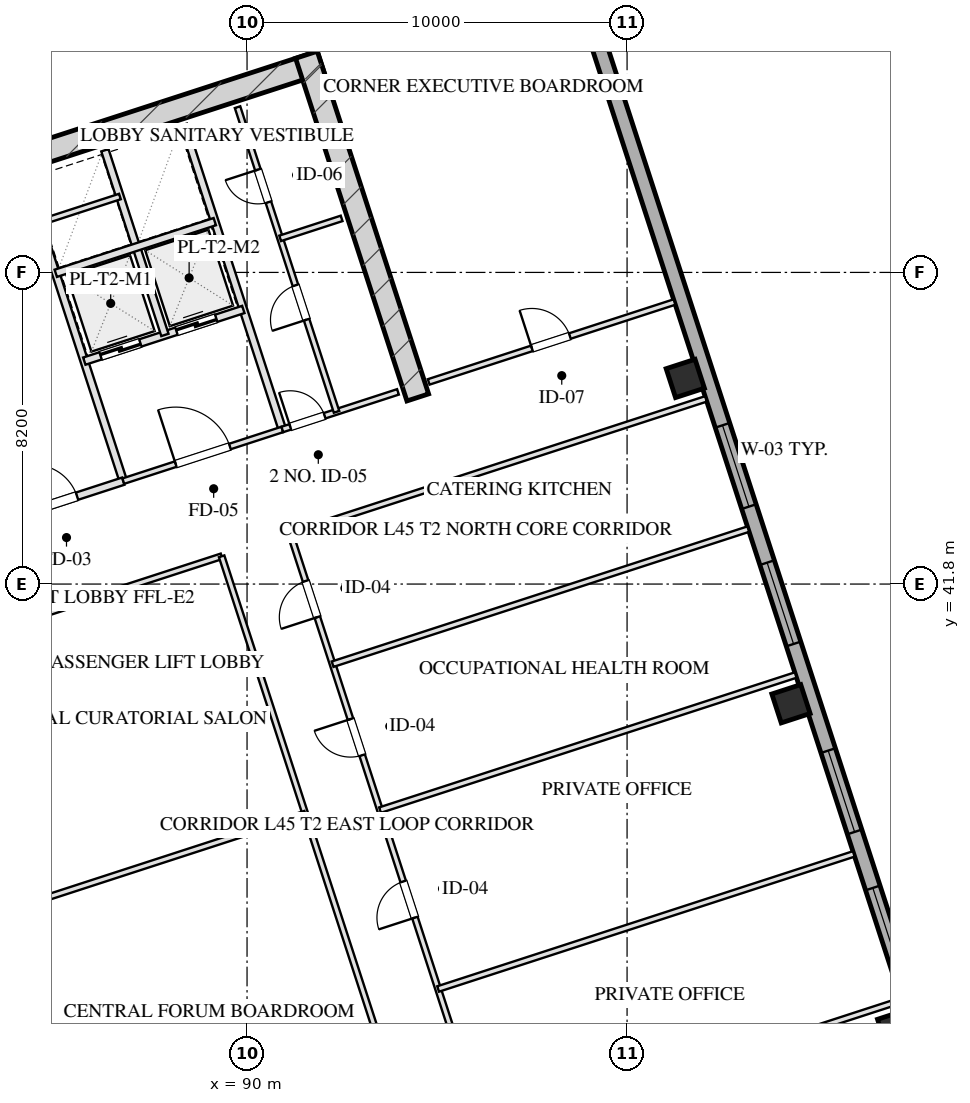
"""IFC4 building model, lengths in metres.
Left out: names, types, materials, properties, quantities, classifications, styles, units other than length and angle.
Written with IfcOpenShell. Run it as: python <this file> out.ifc"""

import sys

from ifc_helpers import new_model, si_unit, direction, frame, frame_2d, origin, origin_2d, place, context, subcontext, project, spatial, rectangle, hollow_rectangle, extrude, element, fill, save


model = new_model("IFC4")
c1 = context("Model", 3, precision=1e-05, world=origin(), true_north=direction((0.0, 1.0)))
c2 = subcontext(c1, "Body", "Model", "MODEL_VIEW")
j1 = project(units=[si_unit("LENGTHUNIT", "METRE"), si_unit("PLANEANGLEUNIT", "RADIAN")], contexts=[c1])
p1 = place(None, origin())
s1 = spatial("IfcSite", under=j1, at=p1, CompositionType="ELEMENT")
p2 = place(p1, origin())
s2 = spatial("IfcBuilding", under=s1, at=p2, CompositionType="ELEMENT")
p3 = place(p2, frame((0.0, 0.0, 170.2)))
s3 = spatial("IfcBuildingStorey", under=s2, at=p3, CompositionType="ELEMENT", Elevation=170.2)
p4 = place(p3, frame((76.344, 50.466, 0.0), z_axis=(0.0, 0.0, 1.0), x_axis=(0.951055727519, 0.309019421968, 0.0)))
e1 = element("IfcWall", 1, at=p4, inside=s3, PredefinedType="SHEAR", context=c2, shape_type="SweptSolid", body=[
    extrude(rectangle(XDim=16.4, YDim=0.6, at=frame_2d((8.2, 0.0))), origin(), (0.0, 0.0, 1.0), 3.45),
])
p5 = place(p3, frame((94.492, 46.71, 0.0), z_axis=(0.0, 0.0, 1.0), x_axis=(-0.309010370028, 0.95105866865, 0.0)))
e2 = element("IfcWall", 2, at=p5, inside=s3, PredefinedType="SHEAR", context=c2, shape_type="SweptSolid", body=[
    extrude(rectangle(XDim=9.48, YDim=0.6, at=frame_2d((4.74, 0.0))), origin(), (0.0, 0.0, 1.0), 3.45),
])
for number, where, z_axis, x_axis in (
    (3, (107.094, 30.091, 0.0), (0.0, 0.0, 1.0), (0.951, 0.309, 0.0)),
    (4, (104.313, 38.651, 0.0), (0.0, 0.0, 1.0), (0.951, 0.309, 0.0)),
    (5, (101.532, 47.21, 0.0), (0.0, 0.0, 1.0), (0.951, 0.309, 0.0)),
):
    element("IfcColumn", number, at=place(p3, frame(where, z_axis=z_axis, x_axis=x_axis)), inside=s3, PredefinedType="COLUMN", context=c2, shape_type="SweptSolid", body=[
        extrude(hollow_rectangle(XDim=0.8, YDim=0.8, WallThickness=0.028, at=origin_2d()), origin(), (0.0, 0.0, 1.0), 3.451),
    ])
p6 = place(p3, frame((70.092, 52.556, 0.0), z_axis=(0.0, 0.0, 1.0), x_axis=(0.951057580055, 0.30901372044, 0.0)))
e6 = element("IfcWall", 6, at=p6, inside=s3, PredefinedType="SOLIDWALL", context=c2, shape_type="SweptSolid", body=[
    extrude(rectangle(XDim=26.4, YDim=0.4, at=frame_2d((13.2, 0.0))), origin(), (0.0, 0.0, 1.0), 2.61),
])
p7 = place(p3, frame((98.224, 59.173, 0.0), z_axis=(0.0, 0.0, 1.0), x_axis=(0.309014228706, -0.951057414911, 0.0)))
e7 = element("IfcWall", 7, at=p7, inside=s3, PredefinedType="SOLIDWALL", context=c2, shape_type="SweptSolid", body=[
    extrude(rectangle(XDim=42.8, YDim=0.4, at=frame_2d((21.4, 0.0))), origin(), (0.0, 0.0, 1.0), 2.61),
])
p8 = place(p7, frame((26.675, 0.0, 0.75)))
e8 = element("IfcOpeningElement", 8, at=p8, cuts=e7, PredefinedType="OPENING", context=c2, shape_type="SweptSolid", body=[
    extrude(rectangle(XDim=2.25, YDim=1.46, at=frame_2d((1.125, 0.73))), frame((0.0, 0.21, 0.0), z_axis=(0.0, -1.0, 0.0), x_axis=(1.0, 0.0, 0.0)), (0.0, 0.0, 1.0), 0.42),
])
p9 = place(p7, frame((22.875, 0.0, 0.75)))
e9 = element("IfcOpeningElement", 9, at=p9, cuts=e7, PredefinedType="OPENING", context=c2, shape_type="SweptSolid", body=[
    extrude(rectangle(XDim=2.25, YDim=1.46, at=frame_2d((1.125, 0.73))), frame((0.0, 0.21, 0.0), z_axis=(0.0, -1.0, 0.0), x_axis=(1.0, 0.0, 0.0)), (0.0, 0.0, 1.0), 0.42),
])
p10 = place(p7, frame((17.675, 0.0, 0.75)))
e10 = element("IfcOpeningElement", 10, at=p10, cuts=e7, PredefinedType="OPENING", context=c2, shape_type="SweptSolid", body=[
    extrude(rectangle(XDim=2.25, YDim=1.46, at=frame_2d((1.125, 0.73))), frame((0.0, 0.21, 0.0), z_axis=(0.0, -1.0, 0.0), x_axis=(1.0, 0.0, 0.0)), (0.0, 0.0, 1.0), 0.42),
])
p11 = place(p7, frame((13.875, 0.0, 0.75)))
e11 = element("IfcOpeningElement", 11, at=p11, cuts=e7, PredefinedType="OPENING", context=c2, shape_type="SweptSolid", body=[
    extrude(rectangle(XDim=2.25, YDim=1.46, at=frame_2d((1.125, 0.73))), frame((0.0, 0.21, 0.0), z_axis=(0.0, -1.0, 0.0), x_axis=(1.0, 0.0, 0.0)), (0.0, 0.0, 1.0), 0.42),
])
p12 = place(p3, frame((86.743, 44.508, 0.0), z_axis=(0.0, 0.0, 1.0), x_axis=(-0.309016001439, 0.951056838919, 0.0)))
e12 = element("IfcWall", 12, at=p12, inside=s3, PredefinedType="PARTITIONING", context=c2, shape_type="SweptSolid", body=[
    extrude(rectangle(XDim=8.43, YDim=0.2, at=frame_2d((4.215, 0.0))), origin(), (0.0, 0.0, 1.0), 3.175),
])
p13 = place(p3, frame((83.101, 43.324, 0.0), z_axis=(0.0, 0.0, 1.0), x_axis=(0.951052804469, 0.309028417967, 0.0)))
e13 = element("IfcWall", 13, at=p13, inside=s3, PredefinedType="PARTITIONING", context=c2, shape_type="SweptSolid", body=[
    extrude(rectangle(XDim=3.83, YDim=0.2, at=frame_2d((1.915, 0.0))), origin(), (0.0, 0.0, 1.0), 3.175),
])
p14 = place(p13, frame((1.35, 0.0, 0.0)))
e14 = element("IfcOpeningElement", 14, at=p14, cuts=e13, PredefinedType="OPENING", context=c2, shape_type="SweptSolid", body=[
    extrude(rectangle(XDim=1.2, YDim=2.05, at=frame_2d((0.6, 1.025))), frame((0.0, 0.11, 0.0), z_axis=(0.0, -1.0, 0.0), x_axis=(1.0, 0.0, 0.0)), (0.0, 0.0, 1.0), 0.22),
])
p15 = place(p3, frame((90.928, 45.868, 0.0), z_axis=(0.0, 0.0, 1.0), x_axis=(-0.309042196757, 0.951048327176, 0.0)))
e15 = element("IfcWall", 15, at=p15, inside=s3, PredefinedType="PARTITIONING", context=c2, shape_type="SweptSolid", body=[
    extrude(rectangle(XDim=8.43, YDim=0.2, at=frame_2d((4.215, 0.0))), origin(), (0.0, 0.0, 1.0), 3.175),
])
p16 = place(p3, frame((86.743, 44.508, 0.0), z_axis=(0.0, 0.0, 1.0), x_axis=(0.951063829732, 0.308994485023, 0.0)))
e16 = element("IfcWall", 16, at=p16, inside=s3, PredefinedType="PARTITIONING", context=c2, shape_type="SweptSolid", body=[
    extrude(rectangle(XDim=4.4, YDim=0.15, at=frame_2d((2.2, 0.0))), origin(), (0.0, 0.0, 1.0), 3.175),
])
p17 = place(p16, frame((1.45, 0.0, 0.0)))
e17 = element("IfcOpeningElement", 17, at=p17, cuts=e16, PredefinedType="OPENING", context=c2, shape_type="SweptSolid", body=[
    extrude(rectangle(XDim=1.5, YDim=2.05, at=frame_2d((0.75, 1.025))), frame((0.0, 0.085, 0.0), z_axis=(0.0, -1.0, 0.0), x_axis=(1.0, 0.0, 0.0)), (0.0, 0.0, 1.0), 0.17),
])
p18 = place(p3, frame((85.718, 47.666, 0.0), z_axis=(0.0, 0.0, 1.0), x_axis=(0.951058531764, 0.30901079133, 0.0)))
e18 = element("IfcWall", 18, at=p18, inside=s3, PredefinedType="PARTITIONING", context=c2, shape_type="SweptSolid", body=[
    extrude(rectangle(XDim=4.4, YDim=0.2, at=frame_2d((2.2, 0.0))), origin(), (0.0, 0.0, 1.0), 3.175),
])
p19 = place(p18, frame((0.45, 0.0, 0.0)))
e19 = element("IfcOpeningElement", 19, at=p19, cuts=e18, PredefinedType="OPENING", context=c2, shape_type="SweptSolid", body=[
    extrude(rectangle(XDim=1.1, YDim=2.05, at=frame_2d((0.55, 1.025))), frame((0.0, 0.11, 0.0), z_axis=(0.0, -1.0, 0.0), x_axis=(1.0, 0.0, 0.0)), (0.0, 0.0, 1.0), 0.22),
])
p20 = place(p18, frame((2.55, 0.0, 0.0)))
e20 = element("IfcOpeningElement", 20, at=p20, cuts=e18, PredefinedType="OPENING", context=c2, shape_type="SweptSolid", body=[
    extrude(rectangle(XDim=1.1, YDim=2.05, at=frame_2d((0.55, 1.025))), frame((0.0, 0.11, 0.0), z_axis=(0.0, -1.0, 0.0), x_axis=(1.0, 0.0, 0.0)), (0.0, 0.0, 1.0), 0.22),
])
p21 = place(p3, frame((87.838, 48.354, 0.0), z_axis=(0.0, 0.0, 1.0), x_axis=(-0.3090093719, 0.951058992953, 0.0)))
e21 = element("IfcWall", 21, at=p21, inside=s3, PredefinedType="PARTITIONING", context=c2, shape_type="SweptSolid", body=[
    extrude(rectangle(XDim=5.11, YDim=0.2, at=frame_2d((2.555, 0.0))), origin(), (0.0, 0.0, 1.0), 3.175),
])
p22 = place(p3, frame((84.967, 49.977, 0.0), z_axis=(0.0, 0.0, 1.0), x_axis=(0.951063829732, 0.308994485023, 0.0)))
e22 = element("IfcWall", 22, at=p22, inside=s3, PredefinedType="PARTITIONING", context=c2, shape_type="SweptSolid", body=[
    extrude(rectangle(XDim=4.4, YDim=0.2, at=frame_2d((2.2, 0.0))), origin(), (0.0, 0.0, 1.0), 3.175),
])
p23 = place(p3, frame((84.534, 51.308, 0.0), z_axis=(0.0, 0.0, 1.0), x_axis=(0.951075093106, 0.308959814982, 0.0)))
e23 = element("IfcWall", 23, at=p23, inside=s3, PredefinedType="PARTITIONING", context=c2, shape_type="SweptSolid", body=[
    extrude(rectangle(XDim=2.23, YDim=0.15, at=frame_2d((1.115, 0.0))), origin(), (0.0, 0.0, 1.0), 3.175),
])
p24 = place(p3, frame((90.928, 45.868, 0.0), z_axis=(0.0, 0.0, 1.0), x_axis=(0.951059297078, 0.309008435874, 0.0)))
e24 = element("IfcWall", 24, at=p24, inside=s3, PredefinedType="PARTITIONING", context=c2, shape_type="SweptSolid", body=[
    extrude(rectangle(XDim=3.2, YDim=0.15, at=frame_2d((1.6, 0.0))), origin(), (0.0, 0.0, 1.0), 3.175),
])
p25 = place(p24, frame((0.22, 0.0, 0.0)))
e25 = element("IfcOpeningElement", 25, at=p25, cuts=e24, PredefinedType="OPENING", context=c2, shape_type="SweptSolid", body=[
    extrude(rectangle(XDim=0.95, YDim=2.05, at=frame_2d((0.475, 1.025))), frame((0.0, 0.085, 0.0), z_axis=(0.0, -1.0, 0.0), x_axis=(1.0, 0.0, 0.0)), (0.0, 0.0, 1.0), 0.17),
])
p26 = place(p3, frame((92.355, 46.331, 0.0), z_axis=(0.0, 0.0, 1.0), x_axis=(-0.309007490203, 0.951059604335, 0.0)))
e26 = element("IfcWall", 26, at=p26, inside=s3, PredefinedType="PARTITIONING", context=c2, shape_type="SweptSolid", body=[
    extrude(rectangle(XDim=8.43, YDim=0.15, at=frame_2d((4.215, 0.0))), origin(), (0.0, 0.0, 1.0), 3.175),
])
p27 = place(p26, frame((2.55, 0.0, 0.0)))
e27 = element("IfcOpeningElement", 27, at=p27, cuts=e26, PredefinedType="OPENING", context=c2, shape_type="SweptSolid", body=[
    extrude(rectangle(XDim=0.95, YDim=2.05, at=frame_2d((0.475, 1.025))), frame((0.0, 0.085, 0.0), z_axis=(0.0, -1.0, 0.0), x_axis=(1.0, 0.0, 0.0)), (0.0, 0.0, 1.0), 0.17),
])
p28 = place(p26, frame((5.8, 0.0, 0.0)))
e28 = element("IfcOpeningElement", 28, at=p28, cuts=e26, PredefinedType="OPENING", context=c2, shape_type="SweptSolid", body=[
    extrude(rectangle(XDim=0.9, YDim=2.05, at=frame_2d((0.45, 1.025))), frame((0.0, 0.085, 0.0), z_axis=(0.0, -1.0, 0.0), x_axis=(1.0, 0.0, 0.0)), (0.0, 0.0, 1.0), 0.17),
])
p29 = place(p3, frame((90.871, 50.896, 0.0), z_axis=(0.0, 0.0, 1.0), x_axis=(0.951054116971, 0.309024378638, 0.0)))
e29 = element("IfcWall", 29, at=p29, inside=s3, PredefinedType="PARTITIONING", context=c2, shape_type="SweptSolid", body=[
    extrude(rectangle(XDim=1.7, YDim=0.15, at=frame_2d((0.85, 0.0))), origin(), (0.0, 0.0, 1.0), 3.175),
])
p30 = place(p3, frame((94.78, 47.119, 0.0), z_axis=(0.0, 0.0, 1.0), x_axis=(0.951057811516, 0.309013008068, 0.0)))
e30 = element("IfcWall", 30, at=p30, inside=s3, PredefinedType="PARTITIONING", context=c2, shape_type="SweptSolid", body=[
    extrude(rectangle(XDim=6.8, YDim=0.15, at=frame_2d((3.4, 0.0))), origin(), (0.0, 0.0, 1.0), 3.175),
])
p31 = place(p30, frame((2.856, 0.0, 0.0)))
e31 = element("IfcOpeningElement", 31, at=p31, cuts=e30, PredefinedType="OPENING", context=c2, shape_type="SweptSolid", body=[
    extrude(rectangle(XDim=1.05, YDim=2.05, at=frame_2d((0.525, 1.025))), frame((0.0, 0.085, 0.0), z_axis=(0.0, -1.0, 0.0), x_axis=(1.0, 0.0, 0.0)), (0.0, 0.0, 1.0), 0.17),
])
p32 = place(p3, frame((96.28, 27.292, 0.0), z_axis=(0.0, 0.0, 1.0), x_axis=(0.951056999652, 0.309015506751, 0.0)))
e32 = element("IfcWall", 32, at=p32, inside=s3, PredefinedType="PARTITIONING", context=c2, shape_type="SweptSolid", body=[
    extrude(rectangle(XDim=11.5, YDim=0.15, at=frame_2d((5.75, 0.0))), origin(), (0.0, 0.0, 1.0), 3.175),
])
p33 = place(p3, frame((81.152, 39.873, 0.0), z_axis=(0.0, 0.0, 1.0), x_axis=(0.951057640494, 0.309013534425, 0.0)))
e33 = element("IfcWall", 33, at=p33, inside=s3, PredefinedType="PARTITIONING", context=c2, shape_type="SweptSolid", body=[
    extrude(rectangle(XDim=8.6, YDim=0.15, at=frame_2d((4.3, 0.0))), origin(), (0.0, 0.0, 1.0), 3.175),
])
p34 = place(p3, frame((91.138, 43.118, 0.0), z_axis=(0.0, 0.0, 1.0), x_axis=(0.951054972381, 0.309021746015, 0.0)))
e34 = element("IfcWall", 34, at=p34, inside=s3, PredefinedType="PARTITIONING", context=c2, shape_type="SweptSolid", body=[
    extrude(rectangle(XDim=11.5, YDim=0.15, at=frame_2d((5.75, 0.0))), origin(), (0.0, 0.0, 1.0), 3.175),
])
p35 = place(p3, frame((86.294, 24.048, 0.0), z_axis=(0.0, 0.0, 1.0), x_axis=(-0.309004459387, 0.951060589068, 0.0)))
e35 = element("IfcWall", 35, at=p35, inside=s3, PredefinedType="PARTITIONING", context=c2, shape_type="SweptSolid", body=[
    extrude(rectangle(XDim=16.64, YDim=0.15, at=frame_2d((8.32, 0.0))), origin(), (0.0, 0.0, 1.0), 3.175),
])
p36 = place(p35, frame((4.284, 0.0, 0.0)))
e36 = element("IfcOpeningElement", 36, at=p36, cuts=e35, PredefinedType="OPENING", context=c2, shape_type="SweptSolid", body=[
    extrude(rectangle(XDim=1.1, YDim=2.05, at=frame_2d((0.55, 1.025))), frame((0.0, 0.085, 0.0), z_axis=(0.0, -1.0, 0.0), x_axis=(1.0, 0.0, 0.0)), (0.0, 0.0, 1.0), 0.17),
])
p37 = place(p35, frame((12.724, 0.0, 0.0)))
e37 = element("IfcOpeningElement", 37, at=p37, cuts=e35, PredefinedType="OPENING", context=c2, shape_type="SweptSolid", body=[
    extrude(rectangle(XDim=1.1, YDim=2.05, at=frame_2d((0.55, 1.025))), frame((0.0, 0.085, 0.0), z_axis=(0.0, -1.0, 0.0), x_axis=(1.0, 0.0, 0.0)), (0.0, 0.0, 1.0), 0.17),
])
p38 = place(p3, frame((94.473, 26.705, 0.0), z_axis=(0.0, 0.0, 1.0), x_axis=(-0.309022042254, 0.951054876125, 0.0)))
e38 = element("IfcWall", 38, at=p38, inside=s3, PredefinedType="PARTITIONING", context=c2, shape_type="SweptSolid", body=[
    extrude(rectangle(XDim=16.64, YDim=0.15, at=frame_2d((8.32, 0.0))), origin(), (0.0, 0.0, 1.0), 3.175),
])
p39 = place(p3, frame((96.28, 27.292, 0.0), z_axis=(0.0, 0.0, 1.0), x_axis=(-0.309008771245, 0.951059188113, 0.0)))
e39 = element("IfcWall", 39, at=p39, inside=s3, PredefinedType="PARTITIONING", context=c2, shape_type="SweptSolid", body=[
    extrude(rectangle(XDim=16.64, YDim=0.15, at=frame_2d((8.32, 0.0))), origin(), (0.0, 0.0, 1.0), 3.175),
])
p40 = place(p39, frame((1.526, 0.0, 0.0)))
e40 = element("IfcOpeningElement", 40, at=p40, cuts=e39, PredefinedType="OPENING", context=c2, shape_type="SweptSolid", body=[
    extrude(rectangle(XDim=1.0, YDim=2.05, at=frame_2d((0.5, 1.025))), frame((0.0, 0.085, 0.0), z_axis=(0.0, -1.0, 0.0), x_axis=(1.0, 0.0, 0.0)), (0.0, 0.0, 1.0), 0.17),
])
p41 = place(p39, frame((6.026, 0.0, 0.0)))
e41 = element("IfcOpeningElement", 41, at=p41, cuts=e39, PredefinedType="OPENING", context=c2, shape_type="SweptSolid", body=[
    extrude(rectangle(XDim=1.0, YDim=2.05, at=frame_2d((0.5, 1.025))), frame((0.0, 0.085, 0.0), z_axis=(0.0, -1.0, 0.0), x_axis=(1.0, 0.0, 0.0)), (0.0, 0.0, 1.0), 0.17),
])
p42 = place(p39, frame((10.519, 0.0, 0.0)))
e42 = element("IfcOpeningElement", 42, at=p42, cuts=e39, PredefinedType="OPENING", context=c2, shape_type="SweptSolid", body=[
    extrude(rectangle(XDim=1.0, YDim=2.05, at=frame_2d((0.5, 1.025))), frame((0.0, 0.085, 0.0), z_axis=(0.0, -1.0, 0.0), x_axis=(1.0, 0.0, 0.0)), (0.0, 0.0, 1.0), 0.17),
])
p43 = place(p39, frame((14.338, 0.0, 0.0)))
e43 = element("IfcOpeningElement", 43, at=p43, cuts=e39, PredefinedType="OPENING", context=c2, shape_type="SweptSolid", body=[
    extrude(rectangle(XDim=1.0, YDim=2.05, at=frame_2d((0.5, 1.025))), frame((0.0, 0.085, 0.0), z_axis=(0.0, -1.0, 0.0), x_axis=(1.0, 0.0, 0.0)), (0.0, 0.0, 1.0), 0.17),
])
p44 = place(p3, frame((83.352, 33.102, 0.0), z_axis=(0.0, 0.0, 1.0), x_axis=(0.951057640494, 0.309013534425, 0.0)))
e44 = element("IfcWall", 44, at=p44, inside=s3, PredefinedType="PARTITIONING", context=c2, shape_type="SweptSolid", body=[
    extrude(rectangle(XDim=8.6, YDim=0.15, at=frame_2d((4.3, 0.0))), origin(), (0.0, 0.0, 1.0), 3.175),
])
p45 = place(p3, frame((95.028, 31.146, 0.0), z_axis=(0.0, 0.0, 1.0), x_axis=(0.951056999652, 0.309015506751, 0.0)))
e45 = element("IfcWall", 45, at=p45, inside=s3, PredefinedType="PARTITIONING", context=c2, shape_type="SweptSolid", body=[
    extrude(rectangle(XDim=11.5, YDim=0.15, at=frame_2d((5.75, 0.0))), origin(), (0.0, 0.0, 1.0), 3.175),
])
p46 = place(p3, frame((93.499, 35.852, 0.0), z_axis=(0.0, 0.0, 1.0), x_axis=(0.951054972381, 0.309021746015, 0.0)))
e46 = element("IfcWall", 46, at=p46, inside=s3, PredefinedType="PARTITIONING", context=c2, shape_type="SweptSolid", body=[
    extrude(rectangle(XDim=11.5, YDim=0.15, at=frame_2d((5.75, 0.0))), origin(), (0.0, 0.0, 1.0), 3.175),
])
p47 = place(p3, frame((92.251, 39.691, 0.0), z_axis=(0.0, 0.0, 1.0), x_axis=(0.951063238644, 0.308996304347, 0.0)))
e47 = element("IfcWall", 47, at=p47, inside=s3, PredefinedType="PARTITIONING", context=c2, shape_type="SweptSolid", body=[
    extrude(rectangle(XDim=11.5, YDim=0.15, at=frame_2d((5.75, 0.0))), origin(), (0.0, 0.0, 1.0), 3.175),
])
p48 = place(p8, origin())
e48 = element("IfcWindow", 48, at=p48, inside=s3, PartitioningType="TRIPLE_PANEL_VERTICAL", PredefinedType="WINDOW", context=c2, shape_type="SweptSolid", body=[
    extrude(rectangle(XDim=2.25, YDim=1.46, at=frame_2d((1.125, 0.73))), frame((0.0, 0.03, 0.0), z_axis=(0.0, -1.0, 0.0), x_axis=(1.0, 0.0, 0.0)), (0.0, 0.0, 1.0), 0.06),
])
fill(e8, e48)
p49 = place(p9, origin())
e49 = element("IfcWindow", 49, at=p49, inside=s3, PartitioningType="TRIPLE_PANEL_VERTICAL", PredefinedType="WINDOW", context=c2, shape_type="SweptSolid", body=[
    extrude(rectangle(XDim=2.25, YDim=1.46, at=frame_2d((1.125, 0.73))), frame((0.0, 0.03, 0.0), z_axis=(0.0, -1.0, 0.0), x_axis=(1.0, 0.0, 0.0)), (0.0, 0.0, 1.0), 0.06),
])
fill(e9, e49)
p50 = place(p10, origin())
e50 = element("IfcWindow", 50, at=p50, inside=s3, PartitioningType="TRIPLE_PANEL_VERTICAL", PredefinedType="WINDOW", context=c2, shape_type="SweptSolid", body=[
    extrude(rectangle(XDim=2.25, YDim=1.46, at=frame_2d((1.125, 0.73))), frame((0.0, 0.03, 0.0), z_axis=(0.0, -1.0, 0.0), x_axis=(1.0, 0.0, 0.0)), (0.0, 0.0, 1.0), 0.06),
])
fill(e10, e50)
p51 = place(p11, origin())
e51 = element("IfcWindow", 51, at=p51, inside=s3, PartitioningType="TRIPLE_PANEL_VERTICAL", PredefinedType="WINDOW", context=c2, shape_type="SweptSolid", body=[
    extrude(rectangle(XDim=2.25, YDim=1.46, at=frame_2d((1.125, 0.73))), frame((0.0, 0.03, 0.0), z_axis=(0.0, -1.0, 0.0), x_axis=(1.0, 0.0, 0.0)), (0.0, 0.0, 1.0), 0.06),
])
fill(e11, e51)
p52 = place(p14, origin())
e52 = element("IfcDoor", 52, at=p52, inside=s3, OperationType="SINGLE_SWING_LEFT", PredefinedType="DOOR", context=c2, shape_type="SweptSolid", body=[
    extrude(rectangle(XDim=1.2, YDim=2.05, at=frame_2d((0.6, 1.025))), frame((0.0, 0.025, 0.0), z_axis=(0.0, -1.0, 0.0), x_axis=(1.0, 0.0, 0.0)), (0.0, 0.0, 1.0), 0.05),
])
fill(e14, e52)
p53 = place(p17, origin())
e53 = element("IfcDoor", 53, at=p53, inside=s3, OperationType="SINGLE_SWING_LEFT", PredefinedType="DOOR", context=c2, shape_type="SweptSolid", body=[
    extrude(rectangle(XDim=1.5, YDim=2.05, at=frame_2d((0.75, 1.025))), frame((0.0, 0.025, 0.0), z_axis=(0.0, -1.0, 0.0), x_axis=(1.0, 0.0, 0.0)), (0.0, 0.0, 1.0), 0.05),
])
fill(e17, e53)
p54 = place(p19, origin())
e54 = element("IfcDoor", 54, at=p54, inside=s3, OperationType="DOUBLE_DOOR_SLIDING", PredefinedType="DOOR", context=c2, shape_type="SweptSolid", body=[
    extrude(rectangle(XDim=1.1, YDim=2.05, at=frame_2d((0.55, 1.025))), frame((0.0, 0.025, 0.0), z_axis=(0.0, -1.0, 0.0), x_axis=(1.0, 0.0, 0.0)), (0.0, 0.0, 1.0), 0.05),
])
fill(e19, e54)
p55 = place(p20, origin())
e55 = element("IfcDoor", 55, at=p55, inside=s3, OperationType="DOUBLE_DOOR_SLIDING", PredefinedType="DOOR", context=c2, shape_type="SweptSolid", body=[
    extrude(rectangle(XDim=1.1, YDim=2.05, at=frame_2d((0.55, 1.025))), frame((0.0, 0.025, 0.0), z_axis=(0.0, -1.0, 0.0), x_axis=(1.0, 0.0, 0.0)), (0.0, 0.0, 1.0), 0.05),
])
fill(e20, e55)
p56 = place(p25, origin())
e56 = element("IfcDoor", 56, at=p56, inside=s3, OperationType="SINGLE_SWING_LEFT", PredefinedType="DOOR", context=c2, shape_type="SweptSolid", body=[
    extrude(rectangle(XDim=0.95, YDim=2.05, at=frame_2d((0.475, 1.025))), frame((0.0, 0.025, 0.0), z_axis=(0.0, -1.0, 0.0), x_axis=(1.0, 0.0, 0.0)), (0.0, 0.0, 1.0), 0.05),
])
fill(e25, e56)
p57 = place(p27, origin())
e57 = element("IfcDoor", 57, at=p57, inside=s3, OperationType="SINGLE_SWING_LEFT", PredefinedType="DOOR", context=c2, shape_type="SweptSolid", body=[
    extrude(rectangle(XDim=0.95, YDim=2.05, at=frame_2d((0.475, 1.025))), frame((0.0, 0.025, 0.0), z_axis=(0.0, -1.0, 0.0), x_axis=(1.0, 0.0, 0.0)), (0.0, 0.0, 1.0), 0.05),
])
fill(e27, e57)
p58 = place(p28, origin())
e58 = element("IfcDoor", 58, at=p58, inside=s3, OperationType="SINGLE_SWING_RIGHT", PredefinedType="DOOR", context=c2, shape_type="SweptSolid", body=[
    extrude(rectangle(XDim=0.9, YDim=2.05, at=frame_2d((0.45, 1.025))), frame((0.0, 0.025, 0.0), z_axis=(0.0, -1.0, 0.0), x_axis=(1.0, 0.0, 0.0)), (0.0, 0.0, 1.0), 0.05),
])
fill(e28, e58)
p59 = place(p31, origin())
e59 = element("IfcDoor", 59, at=p59, inside=s3, OperationType="SINGLE_SWING_LEFT", PredefinedType="DOOR", context=c2, shape_type="SweptSolid", body=[
    extrude(rectangle(XDim=1.05, YDim=2.05, at=frame_2d((0.525, 1.025))), frame((0.0, 0.025, 0.0), z_axis=(0.0, -1.0, 0.0), x_axis=(1.0, 0.0, 0.0)), (0.0, 0.0, 1.0), 0.05),
])
fill(e31, e59)
p60 = place(p41, origin())
e60 = element("IfcDoor", 60, at=p60, inside=s3, OperationType="SINGLE_SWING_LEFT", PredefinedType="DOOR", context=c2, shape_type="SweptSolid", body=[
    extrude(rectangle(XDim=1.0, YDim=2.05, at=frame_2d((0.5, 1.025))), frame((0.0, 0.025, 0.0), z_axis=(0.0, -1.0, 0.0), x_axis=(1.0, 0.0, 0.0)), (0.0, 0.0, 1.0), 0.05),
])
fill(e41, e60)
p61 = place(p42, origin())
e61 = element("IfcDoor", 61, at=p61, inside=s3, OperationType="SINGLE_SWING_RIGHT", PredefinedType="DOOR", context=c2, shape_type="SweptSolid", body=[
    extrude(rectangle(XDim=1.0, YDim=2.05, at=frame_2d((0.5, 1.025))), frame((0.0, 0.025, 0.0), z_axis=(0.0, -1.0, 0.0), x_axis=(1.0, 0.0, 0.0)), (0.0, 0.0, 1.0), 0.05),
])
fill(e42, e61)
p62 = place(p43, origin())
e62 = element("IfcDoor", 62, at=p62, inside=s3, OperationType="SINGLE_SWING_LEFT", PredefinedType="DOOR", context=c2, shape_type="SweptSolid", body=[
    extrude(rectangle(XDim=1.0, YDim=2.05, at=frame_2d((0.5, 1.025))), frame((0.0, 0.025, 0.0), z_axis=(0.0, -1.0, 0.0), x_axis=(1.0, 0.0, 0.0)), (0.0, 0.0, 1.0), 0.05),
])
fill(e43, e62)
save(model, sys.argv[1])
